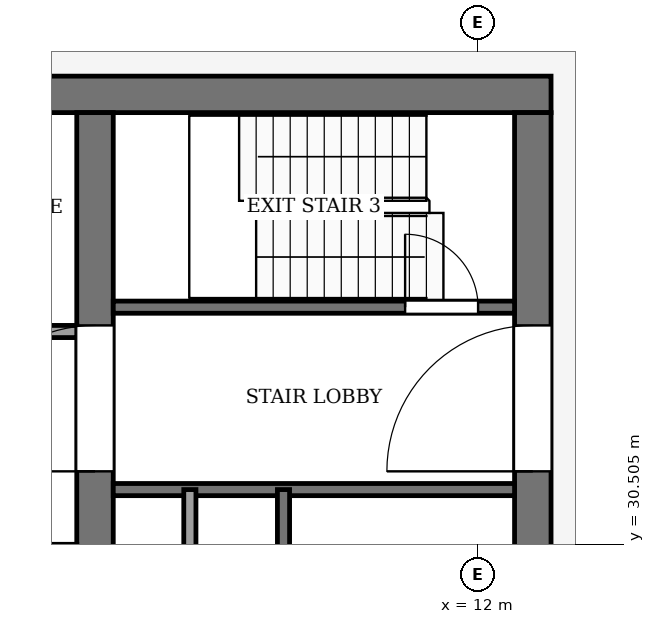
"""IFC4 building model, lengths in metres.
Left out: names, types, materials, properties, quantities, classifications, styles, units other than length and angle.
Written with IfcOpenShell. Run it as: python <this file> out.ifc"""

import sys

from ifc_helpers import new_model, si_unit, direction, frame, frame_2d, origin, place, context, subcontext, project, spatial, rectangle, extrude, element, fill, save


model = new_model("IFC4")
c1 = context("Model", 3, precision=1e-05, world=origin(), true_north=direction((0.0, 1.0)))
c2 = subcontext(c1, "Body", "Model", "MODEL_VIEW")
j1 = project(units=[si_unit("LENGTHUNIT", "METRE"), si_unit("PLANEANGLEUNIT", "RADIAN")], contexts=[c1])
p1 = place(None, origin())
s1 = spatial("IfcSite", under=j1, at=p1, CompositionType="ELEMENT")
p2 = place(p1, origin())
s2 = spatial("IfcBuilding", under=s1, at=p2, CompositionType="ELEMENT")
p3 = place(p2, frame((0.0, 0.0, 326.0)))
s3 = spatial("IfcBuildingStorey", under=s2, at=p3, CompositionType="ELEMENT", Elevation=326.0)
p4 = place(p3, frame((-13.2, 37.9, -0.13), z_axis=(0.0, 0.0, 1.0), x_axis=(1.0, 0.0, 0.0)))
e1 = element("IfcWall", 1, at=p4, inside=s3, PredefinedType="SHEAR", context=c2, shape_type="SweptSolid", body=[
    extrude(rectangle(XDim=26.4, YDim=0.6, at=frame_2d((13.2, 0.0))), origin(), (0.0, 0.0, 1.0), 4.0),
])
p5 = place(p3, frame((12.9, 18.4, -0.13), z_axis=(0.0, 0.0, 1.0), x_axis=(0.0, 1.0, 0.0)))
e2 = element("IfcWall", 2, at=p5, inside=s3, PredefinedType="SHEAR", context=c2, shape_type="SweptSolid", body=[
    extrude(rectangle(XDim=19.2, YDim=0.6, at=frame_2d((9.6, 0.0))), origin(), (0.0, 0.0, 1.0), 4.0),
])
p6 = place(p5, frame((2.8, 0.0, 0.13)))
e3 = element("IfcOpeningElement", 3, at=p6, cuts=e2, PredefinedType="OPENING", context=c2, shape_type="SweptSolid", body=[
    extrude(rectangle(XDim=2.4, YDim=2.4, at=frame_2d((1.2, 1.2))), frame((0.0, 0.31, 0.0), z_axis=(0.0, -1.0, 0.0), x_axis=(1.0, 0.0, 0.0)), (0.0, 0.0, 1.0), 0.62),
])
p7 = place(p5, frame((13.3, 0.0, 0.13)))
e4 = element("IfcOpeningElement", 4, at=p7, cuts=e2, PredefinedType="OPENING", context=c2, shape_type="SweptSolid", body=[
    extrude(rectangle(XDim=2.4, YDim=2.4, at=frame_2d((1.2, 1.2))), frame((0.0, 0.31, 0.0), z_axis=(0.0, -1.0, 0.0), x_axis=(1.0, 0.0, 0.0)), (0.0, 0.0, 1.0), 0.62),
])
p8 = place(p3, frame((5.7, 18.4, -0.13), z_axis=(0.0, 0.0, 1.0), x_axis=(0.0, 1.0, 0.0)))
e5 = element("IfcWall", 5, at=p8, inside=s3, PredefinedType="SHEAR", context=c2, shape_type="SweptSolid", body=[
    extrude(rectangle(XDim=19.2, YDim=0.6, at=frame_2d((9.6, 0.0))), origin(), (0.0, 0.0, 1.0), 4.0),
])
p9 = place(p8, frame((13.3, 0.0, 0.13)))
e6 = element("IfcOpeningElement", 6, at=p9, cuts=e5, PredefinedType="OPENING", context=c2, shape_type="SweptSolid", body=[
    extrude(rectangle(XDim=2.4, YDim=2.4, at=frame_2d((1.2, 1.2))), frame((0.0, 0.31, 0.0), z_axis=(0.0, -1.0, 0.0), x_axis=(1.0, 0.0, 0.0)), (0.0, 0.0, 1.0), 0.62),
])
p10 = place(p3, frame((6.0, 31.4, 0.0), z_axis=(0.0, 0.0, 1.0), x_axis=(1.0, 0.0, 0.0)))
e7 = element("IfcWall", 7, at=p10, inside=s3, PredefinedType="PARTITIONING", context=c2, shape_type="SweptSolid", body=[
    extrude(rectangle(XDim=6.6, YDim=0.2, at=frame_2d((3.3, 0.0))), origin(), (0.0, 0.0, 1.0), 3.87),
])
p11 = place(p3, frame((-5.4, 34.0, 0.0), z_axis=(0.0, 0.0, 1.0), x_axis=(1.0, 0.0, 0.0)))
e8 = element("IfcWall", 8, at=p11, inside=s3, PredefinedType="PARTITIONING", context=c2, shape_type="SweptSolid", body=[
    extrude(rectangle(XDim=10.8, YDim=0.2, at=frame_2d((5.4, 0.0))), origin(), (0.0, 0.0, 1.0), 3.87),
])
p12 = place(p11, frame((6.15, 0.0, 0.0)))
e9 = element("IfcOpeningElement", 9, at=p12, cuts=e8, PredefinedType="OPENING", context=c2, shape_type="SweptSolid", body=[
    extrude(rectangle(XDim=1.2, YDim=2.2, at=frame_2d((0.6, 1.1))), frame((0.0, 0.11, 0.0), z_axis=(0.0, -1.0, 0.0), x_axis=(1.0, 0.0, 0.0)), (0.0, 0.0, 1.0), 0.22),
])
p13 = place(p11, frame((8.95, 0.0, 0.0)))
e10 = element("IfcOpeningElement", 10, at=p13, cuts=e8, PredefinedType="OPENING", context=c2, shape_type="SweptSolid", body=[
    extrude(rectangle(XDim=1.0, YDim=2.1, at=frame_2d((0.5, 1.05))), frame((0.0, 0.11, 0.0), z_axis=(0.0, -1.0, 0.0), x_axis=(1.0, 0.0, 0.0)), (0.0, 0.0, 1.0), 0.22),
])
p14 = place(p3, frame((6.0, 34.4, 0.0), z_axis=(0.0, 0.0, 1.0), x_axis=(1.0, 0.0, 0.0)))
e11 = element("IfcWall", 11, at=p14, inside=s3, PredefinedType="PARTITIONING", context=c2, shape_type="SweptSolid", body=[
    extrude(rectangle(XDim=6.6, YDim=0.2, at=frame_2d((3.3, 0.0))), origin(), (0.0, 0.0, 1.0), 3.87),
])
p15 = place(p14, frame((4.8, 0.0, 0.0)))
e12 = element("IfcOpeningElement", 12, at=p15, cuts=e11, PredefinedType="OPENING", context=c2, shape_type="SweptSolid", body=[
    extrude(rectangle(XDim=1.2, YDim=2.2, at=frame_2d((0.6, 1.1))), frame((0.0, 0.11, 0.0), z_axis=(0.0, -1.0, 0.0), x_axis=(1.0, 0.0, 0.0)), (0.0, 0.0, 1.0), 0.22),
])
for number, where, z_axis, x_axis in (
    (13, (7.26, 24.0, 0.0), (0.0, 0.0, 1.0), (0.0, 1.0, 0.0)),
    (14, (8.8, 24.0, 0.0), (0.0, 0.0, 1.0), (0.0, 1.0, 0.0)),
):
    element("IfcWall", number, at=place(p3, frame(where, z_axis=z_axis, x_axis=x_axis)), inside=s3, PredefinedType="PARTITIONING", context=c2, shape_type="SweptSolid", body=[
        extrude(rectangle(XDim=7.4, YDim=0.2, at=frame_2d((3.7, 0.0))), origin(), (0.0, 0.0, 1.0), 3.87),
    ])
p16 = place(p15, origin())
e15 = element("IfcDoor", 15, at=p16, inside=s3, OperationType="SINGLE_SWING_RIGHT", PredefinedType="DOOR", context=c2, shape_type="SweptSolid", body=[
    extrude(rectangle(XDim=1.2, YDim=2.2, at=frame_2d((0.6, 1.1))), frame((0.0, 0.025, 0.0), z_axis=(0.0, -1.0, 0.0), x_axis=(1.0, 0.0, 0.0)), (0.0, 0.0, 1.0), 0.05),
])
fill(e12, e15)
p17 = place(p9, origin())
e16 = element("IfcDoor", 16, at=p17, inside=s3, OperationType="DOUBLE_DOOR_SINGLE_SWING", PredefinedType="DOOR", context=c2, shape_type="SweptSolid", body=[
    extrude(rectangle(XDim=2.4, YDim=2.4, at=frame_2d((1.2, 1.2))), frame((0.0, 0.025, 0.0), z_axis=(0.0, -1.0, 0.0), x_axis=(1.0, 0.0, 0.0)), (0.0, 0.0, 1.0), 0.05),
])
fill(e6, e16)
p18 = place(p7, origin())
e17 = element("IfcDoor", 17, at=p18, inside=s3, OperationType="DOUBLE_DOOR_SINGLE_SWING", PredefinedType="DOOR", context=c2, shape_type="SweptSolid", body=[
    extrude(rectangle(XDim=2.4, YDim=2.4, at=frame_2d((1.2, 1.2))), frame((0.0, 0.025, 0.0), z_axis=(0.0, -1.0, 0.0), x_axis=(1.0, 0.0, 0.0)), (0.0, 0.0, 1.0), 0.05),
])
fill(e4, e17)
save(model, sys.argv[1])
